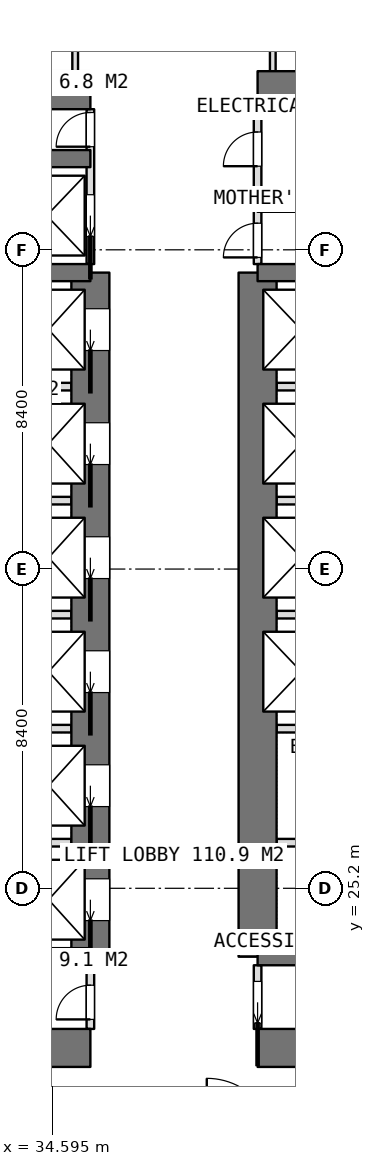
"""IFC4 building model, lengths in metres.
Left out: names, types, materials, properties, quantities, classifications, styles, units other than length and angle.
Written with IfcOpenShell. Run it as: python <this file> out.ifc"""

import sys

from ifc_helpers import new_model, si_unit, direction, frame, frame_2d, origin, place, context, subcontext, project, spatial, rectangle, extrude, element, fill, save


model = new_model("IFC4")
c1 = context("Model", 3, precision=1e-05, world=origin(), true_north=direction((0.0, 1.0)))
c2 = subcontext(c1, "Body", "Model", "MODEL_VIEW")
j1 = project(units=[si_unit("LENGTHUNIT", "METRE"), si_unit("PLANEANGLEUNIT", "RADIAN")], contexts=[c1])
p1 = place(None, origin())
s1 = spatial("IfcSite", under=j1, at=p1, CompositionType="ELEMENT")
p2 = place(p1, origin())
s2 = spatial("IfcBuilding", under=s1, at=p2, CompositionType="ELEMENT")
p3 = place(p2, frame((0.0, 0.0, 95.3)))
s3 = spatial("IfcBuildingStorey", under=s2, at=p3, CompositionType="ELEMENT", Elevation=95.3)
p4 = place(p3, frame((25.2, 21.0, 0.0), z_axis=(0.0, 0.0, 1.0), x_axis=(1.0, 0.0, 0.0)))
e1 = element("IfcWall", 1, at=p4, inside=s3, PredefinedType="SHEAR", context=c2, shape_type="SweptSolid", body=[
    extrude(rectangle(XDim=10.4, YDim=1.0, at=frame_2d((5.2, 0.0))), origin(), (0.0, 0.0, 1.0), 3.75),
])
p5 = place(p3, frame((40.0, 21.0, 0.0), z_axis=(0.0, 0.0, 1.0), x_axis=(1.0, 0.0, 0.0)))
e2 = element("IfcWall", 2, at=p5, inside=s3, PredefinedType="SHEAR", context=c2, shape_type="SweptSolid", body=[
    extrude(rectangle(XDim=10.4, YDim=1.0, at=frame_2d((5.2, 0.0))), origin(), (0.0, 0.0, 1.0), 3.75),
])
p6 = place(p3, frame((25.2, 46.2, 0.0), z_axis=(0.0, 0.0, 1.0), x_axis=(1.0, 0.0, 0.0)))
e3 = element("IfcWall", 3, at=p6, inside=s3, PredefinedType="SHEAR", context=c2, shape_type="SweptSolid", body=[
    extrude(rectangle(XDim=10.4, YDim=1.0, at=frame_2d((5.2, 0.0))), origin(), (0.0, 0.0, 1.0), 3.75),
])
p7 = place(p3, frame((40.0, 46.2, 0.0), z_axis=(0.0, 0.0, 1.0), x_axis=(1.0, 0.0, 0.0)))
e4 = element("IfcWall", 4, at=p7, inside=s3, PredefinedType="SHEAR", context=c2, shape_type="SweptSolid", body=[
    extrude(rectangle(XDim=10.4, YDim=1.0, at=frame_2d((5.2, 0.0))), origin(), (0.0, 0.0, 1.0), 3.75),
])
p8 = place(p3, frame((35.6, 23.4, 0.0), z_axis=(0.0, 0.0, 1.0), x_axis=(0.0, 1.0, 0.0)))
e5 = element("IfcWall", 5, at=p8, inside=s3, PredefinedType="SHEAR", context=c2, shape_type="SweptSolid", body=[
    extrude(rectangle(XDim=18.0, YDim=1.0, at=frame_2d((9.0, 0.0))), origin(), (0.0, 0.0, 1.0), 3.75),
])
p9 = place(p8, frame((0.95, 0.0, 0.0)))
e6 = element("IfcOpeningElement", 6, at=p9, cuts=e5, PredefinedType="OPENING", context=c2, shape_type="SweptSolid", body=[
    extrude(rectangle(XDim=1.1, YDim=2.1, at=frame_2d((0.55, 1.05))), frame((0.0, 0.51, 0.0), z_axis=(0.0, -1.0, 0.0), x_axis=(1.0, 0.0, 0.0)), (0.0, 0.0, 1.0), 1.02),
])
p10 = place(p8, frame((3.95, 0.0, 0.0)))
e7 = element("IfcOpeningElement", 7, at=p10, cuts=e5, PredefinedType="OPENING", context=c2, shape_type="SweptSolid", body=[
    extrude(rectangle(XDim=1.1, YDim=2.1, at=frame_2d((0.55, 1.05))), frame((0.0, 0.51, 0.0), z_axis=(0.0, -1.0, 0.0), x_axis=(1.0, 0.0, 0.0)), (0.0, 0.0, 1.0), 1.02),
])
p11 = place(p8, frame((6.95, 0.0, 0.0)))
e8 = element("IfcOpeningElement", 8, at=p11, cuts=e5, PredefinedType="OPENING", context=c2, shape_type="SweptSolid", body=[
    extrude(rectangle(XDim=1.1, YDim=2.1, at=frame_2d((0.55, 1.05))), frame((0.0, 0.51, 0.0), z_axis=(0.0, -1.0, 0.0), x_axis=(1.0, 0.0, 0.0)), (0.0, 0.0, 1.0), 1.02),
])
p12 = place(p8, frame((9.95, 0.0, 0.0)))
e9 = element("IfcOpeningElement", 9, at=p12, cuts=e5, PredefinedType="OPENING", context=c2, shape_type="SweptSolid", body=[
    extrude(rectangle(XDim=1.1, YDim=2.1, at=frame_2d((0.55, 1.05))), frame((0.0, 0.51, 0.0), z_axis=(0.0, -1.0, 0.0), x_axis=(1.0, 0.0, 0.0)), (0.0, 0.0, 1.0), 1.02),
])
p13 = place(p8, frame((12.95, 0.0, 0.0)))
e10 = element("IfcOpeningElement", 10, at=p13, cuts=e5, PredefinedType="OPENING", context=c2, shape_type="SweptSolid", body=[
    extrude(rectangle(XDim=1.1, YDim=2.1, at=frame_2d((0.55, 1.05))), frame((0.0, 0.51, 0.0), z_axis=(0.0, -1.0, 0.0), x_axis=(1.0, 0.0, 0.0)), (0.0, 0.0, 1.0), 1.02),
])
p14 = place(p8, frame((15.95, 0.0, 0.0)))
e11 = element("IfcOpeningElement", 11, at=p14, cuts=e5, PredefinedType="OPENING", context=c2, shape_type="SweptSolid", body=[
    extrude(rectangle(XDim=1.1, YDim=2.1, at=frame_2d((0.55, 1.05))), frame((0.0, 0.51, 0.0), z_axis=(0.0, -1.0, 0.0), x_axis=(1.0, 0.0, 0.0)), (0.0, 0.0, 1.0), 1.02),
])
p15 = place(p3, frame((40.0, 23.4, 0.0), z_axis=(0.0, 0.0, 1.0), x_axis=(0.0, 1.0, 0.0)))
e12 = element("IfcWall", 12, at=p15, inside=s3, PredefinedType="SHEAR", context=c2, shape_type="SweptSolid", body=[
    extrude(rectangle(XDim=18.0, YDim=1.0, at=frame_2d((9.0, 0.0))), origin(), (0.0, 0.0, 1.0), 3.75),
])
for number, where, z_axis, x_axis in (
    (13, (31.8, 23.4, 0.0), (0.0, 0.0, 1.0), (1.0, 0.0, 0.0)),
    (14, (31.8, 41.4, 0.0), (0.0, 0.0, 1.0), (1.0, 0.0, 0.0)),
    (15, (31.8, 44.4, 0.0), (0.0, 0.0, 1.0), (1.0, 0.0, 0.0)),
    (16, (40.0, 23.4, 0.0), (0.0, 0.0, 1.0), (1.0, 0.0, 0.0)),
    (17, (40.0, 41.4, 0.0), (0.0, 0.0, 1.0), (1.0, 0.0, 0.0)),
):
    element("IfcWall", number, at=place(p3, frame(where, z_axis=z_axis, x_axis=x_axis)), inside=s3, PredefinedType="SHEAR", context=c2, shape_type="SweptSolid", body=[
        extrude(rectangle(XDim=3.8, YDim=0.45, at=frame_2d((1.9, 0.0))), origin(), (0.0, 0.0, 1.0), 3.75),
    ])
for number, where, z_axis, x_axis in (
    (18, (32.025, 26.4, 0.0), (0.0, 0.0, 1.0), (1.0, 0.0, 0.0)),
    (19, (32.025, 29.4, 0.0), (0.0, 0.0, 1.0), (1.0, 0.0, 0.0)),
    (20, (32.025, 32.4, 0.0), (0.0, 0.0, 1.0), (1.0, 0.0, 0.0)),
    (21, (32.025, 35.4, 0.0), (0.0, 0.0, 1.0), (1.0, 0.0, 0.0)),
    (22, (32.025, 38.4, 0.0), (0.0, 0.0, 1.0), (1.0, 0.0, 0.0)),
):
    element("IfcWall", number, at=place(p3, frame(where, z_axis=z_axis, x_axis=x_axis)), inside=s3, PredefinedType="PARTITIONING", context=c2, shape_type="SweptSolid", body=[
        extrude(rectangle(XDim=3.075, YDim=0.2, at=frame_2d((1.538, 0.0))), origin(), (0.0, 0.0, 1.0), 3.5),
    ])
for number, where, z_axis, x_axis in (
    (23, (40.5, 26.4, 0.0), (0.0, 0.0, 1.0), (1.0, 0.0, 0.0)),
    (24, (40.5, 29.4, 0.0), (0.0, 0.0, 1.0), (1.0, 0.0, 0.0)),
    (25, (40.5, 32.4, 0.0), (0.0, 0.0, 1.0), (1.0, 0.0, 0.0)),
    (26, (40.5, 35.4, 0.0), (0.0, 0.0, 1.0), (1.0, 0.0, 0.0)),
    (27, (40.5, 38.4, 0.0), (0.0, 0.0, 1.0), (1.0, 0.0, 0.0)),
):
    element("IfcWall", number, at=place(p3, frame(where, z_axis=z_axis, x_axis=x_axis)), inside=s3, PredefinedType="PARTITIONING", context=c2, shape_type="SweptSolid", body=[
        extrude(rectangle(XDim=3.075, YDim=0.2, at=frame_2d((1.538, 0.0))), origin(), (0.0, 0.0, 1.0), 3.5),
    ])
p16 = place(p3, frame((40.0, 21.5, 0.0), z_axis=(0.0, 0.0, 1.0), x_axis=(0.0, 1.0, 0.0)))
e28 = element("IfcWall", 28, at=p16, inside=s3, PredefinedType="PARTITIONING", context=c2, shape_type="SweptSolid", body=[
    extrude(rectangle(XDim=1.675, YDim=0.2, at=frame_2d((0.837, 0.0))), origin(), (0.0, 0.0, 1.0), 3.5),
])
p17 = place(p16, frame((0.15, 0.0, 0.0)))
e29 = element("IfcOpeningElement", 29, at=p17, cuts=e28, PredefinedType="OPENING", context=c2, shape_type="SweptSolid", body=[
    extrude(rectangle(XDim=1.1, YDim=2.1, at=frame_2d((0.55, 1.05))), frame((0.0, 0.11, 0.0), z_axis=(0.0, -1.0, 0.0), x_axis=(1.0, 0.0, 0.0)), (0.0, 0.0, 1.0), 0.22),
])
p18 = place(p3, frame((40.0, 41.625, 0.0), z_axis=(0.0, 0.0, 1.0), x_axis=(0.0, 1.0, 0.0)))
e30 = element("IfcWall", 30, at=p18, inside=s3, PredefinedType="PARTITIONING", context=c2, shape_type="SweptSolid", body=[
    extrude(rectangle(XDim=4.075, YDim=0.2, at=frame_2d((2.038, 0.0))), origin(), (0.0, 0.0, 1.0), 3.5),
])
p19 = place(p18, frame((2.575, 0.0, 0.0)))
e31 = element("IfcOpeningElement", 31, at=p19, cuts=e30, PredefinedType="OPENING", context=c2, shape_type="SweptSolid", body=[
    extrude(rectangle(XDim=0.9, YDim=2.1, at=frame_2d((0.45, 1.05))), frame((0.0, 0.11, 0.0), z_axis=(0.0, -1.0, 0.0), x_axis=(1.0, 0.0, 0.0)), (0.0, 0.0, 1.0), 0.22),
])
p20 = place(p18, frame((0.175, 0.0, 0.0)))
e32 = element("IfcOpeningElement", 32, at=p20, cuts=e30, PredefinedType="OPENING", context=c2, shape_type="SweptSolid", body=[
    extrude(rectangle(XDim=0.9, YDim=2.1, at=frame_2d((0.45, 1.05))), frame((0.0, 0.11, 0.0), z_axis=(0.0, -1.0, 0.0), x_axis=(1.0, 0.0, 0.0)), (0.0, 0.0, 1.0), 0.22),
])
p21 = place(p3, frame((35.6, 41.625, 0.0), z_axis=(0.0, 0.0, 1.0), x_axis=(0.0, 1.0, 0.0)))
e33 = element("IfcWall", 33, at=p21, inside=s3, PredefinedType="PARTITIONING", context=c2, shape_type="SweptSolid", body=[
    extrude(rectangle(XDim=4.075, YDim=0.2, at=frame_2d((2.038, 0.0))), origin(), (0.0, 0.0, 1.0), 3.5),
])
p22 = place(p21, frame((3.088, 0.0, 0.0)))
e34 = element("IfcOpeningElement", 34, at=p22, cuts=e33, PredefinedType="OPENING", context=c2, shape_type="SweptSolid", body=[
    extrude(rectangle(XDim=0.9, YDim=2.1, at=frame_2d((0.45, 1.05))), frame((0.0, 0.11, 0.0), z_axis=(0.0, -1.0, 0.0), x_axis=(1.0, 0.0, 0.0)), (0.0, 0.0, 1.0), 0.22),
])
p23 = place(p21, frame((0.725, 0.0, 0.0)))
e35 = element("IfcOpeningElement", 35, at=p23, cuts=e33, PredefinedType="OPENING", context=c2, shape_type="SweptSolid", body=[
    extrude(rectangle(XDim=1.1, YDim=2.1, at=frame_2d((0.55, 1.05))), frame((0.0, 0.11, 0.0), z_axis=(0.0, -1.0, 0.0), x_axis=(1.0, 0.0, 0.0)), (0.0, 0.0, 1.0), 0.22),
])
p24 = place(p3, frame((35.6, 21.5, 0.0), z_axis=(0.0, 0.0, 1.0), x_axis=(0.0, 1.0, 0.0)))
e36 = element("IfcWall", 36, at=p24, inside=s3, PredefinedType="PARTITIONING", context=c2, shape_type="SweptSolid", body=[
    extrude(rectangle(XDim=1.675, YDim=0.2, at=frame_2d((0.837, 0.0))), origin(), (0.0, 0.0, 1.0), 3.5),
])
p25 = place(p24, frame((0.25, 0.0, 0.0)))
e37 = element("IfcOpeningElement", 37, at=p25, cuts=e36, PredefinedType="OPENING", context=c2, shape_type="SweptSolid", body=[
    extrude(rectangle(XDim=0.9, YDim=2.1, at=frame_2d((0.45, 1.05))), frame((0.0, 0.11, 0.0), z_axis=(0.0, -1.0, 0.0), x_axis=(1.0, 0.0, 0.0)), (0.0, 0.0, 1.0), 0.22),
])
p26 = place(p3, frame((40.0, 43.1, 0.0), z_axis=(0.0, 0.0, 1.0), x_axis=(1.0, 0.0, 0.0)))
e38 = element("IfcWall", 38, at=p26, inside=s3, PredefinedType="PARTITIONING", context=c2, shape_type="SweptSolid", body=[
    extrude(rectangle(XDim=3.575, YDim=0.2, at=frame_2d((1.788, 0.0))), origin(), (0.0, 0.0, 1.0), 3.5),
])
for number, where, z_axis, x_axis in (
    (39, (40.4, 46.7, 0.0), (0.0, 0.0, 1.0), (0.0, 1.0, 0.0)),
    (40, (35.2, 46.7, 0.0), (0.0, 0.0, 1.0), (0.0, 1.0, 0.0)),
):
    element("IfcWall", number, at=place(p3, frame(where, z_axis=z_axis, x_axis=x_axis)), inside=s3, PredefinedType="PARTITIONING", context=c2, shape_type="SweptSolid", body=[
        extrude(rectangle(XDim=2.625, YDim=0.15, at=frame_2d((1.312, 0.0))), origin(), (0.0, 0.0, 1.0), 3.5),
    ])
p27 = place(p17, origin())
e41 = element("IfcDoor", 41, at=p27, inside=s3, OperationType="SLIDING_TO_LEFT", PredefinedType="DOOR", context=c2, shape_type="SweptSolid", body=[
    extrude(rectangle(XDim=1.1, YDim=2.1, at=frame_2d((0.55, 1.05))), frame((0.0, 0.025, 0.0), z_axis=(0.0, -1.0, 0.0), x_axis=(1.0, 0.0, 0.0)), (0.0, 0.0, 1.0), 0.05),
])
fill(e29, e41)
p28 = place(p25, origin())
e42 = element("IfcDoor", 42, at=p28, inside=s3, OperationType="SINGLE_SWING_LEFT", PredefinedType="DOOR", context=c2, shape_type="SweptSolid", body=[
    extrude(rectangle(XDim=0.9, YDim=2.1, at=frame_2d((0.45, 1.05))), frame((0.0, 0.025, 0.0), z_axis=(0.0, -1.0, 0.0), x_axis=(1.0, 0.0, 0.0)), (0.0, 0.0, 1.0), 0.05),
])
fill(e37, e42)
p29 = place(p19, origin())
e43 = element("IfcDoor", 43, at=p29, inside=s3, OperationType="SINGLE_SWING_LEFT", PredefinedType="DOOR", context=c2, shape_type="SweptSolid", body=[
    extrude(rectangle(XDim=0.9, YDim=2.1, at=frame_2d((0.45, 1.05))), frame((0.0, 0.025, 0.0), z_axis=(0.0, -1.0, 0.0), x_axis=(1.0, 0.0, 0.0)), (0.0, 0.0, 1.0), 0.05),
])
fill(e31, e43)
p30 = place(p20, origin())
e44 = element("IfcDoor", 44, at=p30, inside=s3, OperationType="SINGLE_SWING_LEFT", PredefinedType="DOOR", context=c2, shape_type="SweptSolid", body=[
    extrude(rectangle(XDim=0.9, YDim=2.1, at=frame_2d((0.45, 1.05))), frame((0.0, 0.025, 0.0), z_axis=(0.0, -1.0, 0.0), x_axis=(1.0, 0.0, 0.0)), (0.0, 0.0, 1.0), 0.05),
])
fill(e32, e44)
p31 = place(p22, origin())
e45 = element("IfcDoor", 45, at=p31, inside=s3, OperationType="SINGLE_SWING_LEFT", PredefinedType="DOOR", context=c2, shape_type="SweptSolid", body=[
    extrude(rectangle(XDim=0.9, YDim=2.1, at=frame_2d((0.45, 1.05))), frame((0.0, 0.025, 0.0), z_axis=(0.0, -1.0, 0.0), x_axis=(1.0, 0.0, 0.0)), (0.0, 0.0, 1.0), 0.05),
])
fill(e34, e45)
p32 = place(p9, origin())
e46 = element("IfcDoor", 46, at=p32, inside=s3, OperationType="SLIDING_TO_LEFT", PredefinedType="USERDEFINED", context=c2, shape_type="SweptSolid", body=[
    extrude(rectangle(XDim=1.1, YDim=2.1, at=frame_2d((0.55, 1.05))), frame((0.0, 0.025, 0.0), z_axis=(0.0, -1.0, 0.0), x_axis=(1.0, 0.0, 0.0)), (0.0, 0.0, 1.0), 0.05),
])
fill(e6, e46)
p33 = place(p10, origin())
e47 = element("IfcDoor", 47, at=p33, inside=s3, OperationType="SLIDING_TO_LEFT", PredefinedType="USERDEFINED", context=c2, shape_type="SweptSolid", body=[
    extrude(rectangle(XDim=1.1, YDim=2.1, at=frame_2d((0.55, 1.05))), frame((0.0, 0.025, 0.0), z_axis=(0.0, -1.0, 0.0), x_axis=(1.0, 0.0, 0.0)), (0.0, 0.0, 1.0), 0.05),
])
fill(e7, e47)
p34 = place(p11, origin())
e48 = element("IfcDoor", 48, at=p34, inside=s3, OperationType="SLIDING_TO_LEFT", PredefinedType="USERDEFINED", context=c2, shape_type="SweptSolid", body=[
    extrude(rectangle(XDim=1.1, YDim=2.1, at=frame_2d((0.55, 1.05))), frame((0.0, 0.025, 0.0), z_axis=(0.0, -1.0, 0.0), x_axis=(1.0, 0.0, 0.0)), (0.0, 0.0, 1.0), 0.05),
])
fill(e8, e48)
p35 = place(p12, origin())
e49 = element("IfcDoor", 49, at=p35, inside=s3, OperationType="SLIDING_TO_LEFT", PredefinedType="USERDEFINED", context=c2, shape_type="SweptSolid", body=[
    extrude(rectangle(XDim=1.1, YDim=2.1, at=frame_2d((0.55, 1.05))), frame((0.0, 0.025, 0.0), z_axis=(0.0, -1.0, 0.0), x_axis=(1.0, 0.0, 0.0)), (0.0, 0.0, 1.0), 0.05),
])
fill(e9, e49)
p36 = place(p13, origin())
e50 = element("IfcDoor", 50, at=p36, inside=s3, OperationType="SLIDING_TO_LEFT", PredefinedType="USERDEFINED", context=c2, shape_type="SweptSolid", body=[
    extrude(rectangle(XDim=1.1, YDim=2.1, at=frame_2d((0.55, 1.05))), frame((0.0, 0.025, 0.0), z_axis=(0.0, -1.0, 0.0), x_axis=(1.0, 0.0, 0.0)), (0.0, 0.0, 1.0), 0.05),
])
fill(e10, e50)
p37 = place(p14, origin())
e51 = element("IfcDoor", 51, at=p37, inside=s3, OperationType="SLIDING_TO_LEFT", PredefinedType="USERDEFINED", context=c2, shape_type="SweptSolid", body=[
    extrude(rectangle(XDim=1.1, YDim=2.1, at=frame_2d((0.55, 1.05))), frame((0.0, 0.025, 0.0), z_axis=(0.0, -1.0, 0.0), x_axis=(1.0, 0.0, 0.0)), (0.0, 0.0, 1.0), 0.05),
])
fill(e11, e51)
p38 = place(p23, origin())
e52 = element("IfcDoor", 52, at=p38, inside=s3, OperationType="SLIDING_TO_LEFT", PredefinedType="USERDEFINED", context=c2, shape_type="SweptSolid", body=[
    extrude(rectangle(XDim=1.1, YDim=2.1, at=frame_2d((0.55, 1.05))), frame((0.0, 0.025, 0.0), z_axis=(0.0, -1.0, 0.0), x_axis=(1.0, 0.0, 0.0)), (0.0, 0.0, 1.0), 0.05),
])
fill(e35, e52)
save(model, sys.argv[1])
